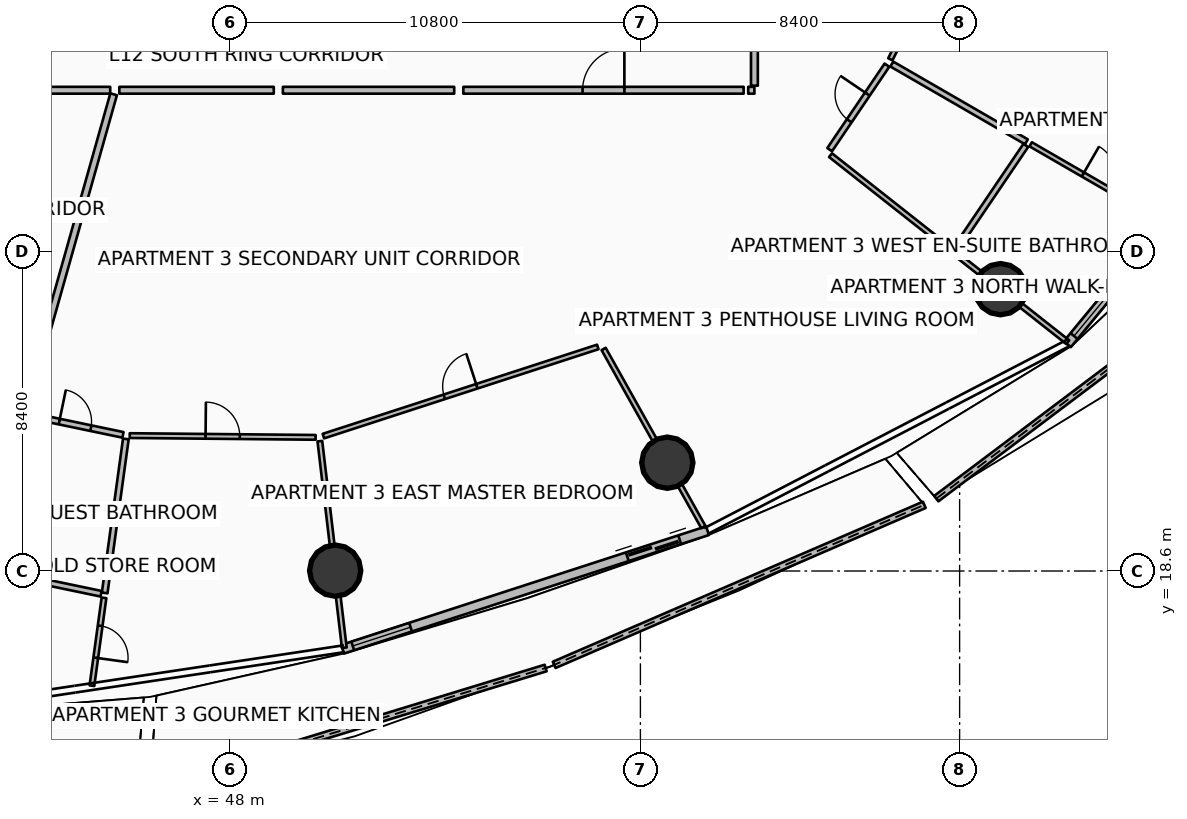
"""IFC4 building model, lengths in metres.
Left out: names, types, materials, properties, quantities, classifications, styles, units other than length and angle.
Written with IfcOpenShell. Run it as: python <this file> out.ifc"""

import sys

from ifc_helpers import new_model, si_unit, direction, frame, frame_2d, origin, origin_2d, place, context, subcontext, project, spatial, polyline, rectangle, circle, outline, extrude, element, fill, save


model = new_model("IFC4")
c1 = context("Model", 3, precision=1e-05, world=origin(), true_north=direction((0.0, 1.0)))
c2 = subcontext(c1, "Body", "Model", "MODEL_VIEW")
j1 = project(units=[si_unit("LENGTHUNIT", "METRE"), si_unit("PLANEANGLEUNIT", "RADIAN")], contexts=[c1])
p1 = place(None, origin())
s1 = spatial("IfcSite", under=j1, at=p1, CompositionType="ELEMENT")
p2 = place(p1, origin())
s2 = spatial("IfcBuilding", under=s1, at=p2, CompositionType="ELEMENT")
p3 = place(p2, frame((0.0, 0.0, 52.65)))
s3 = spatial("IfcBuildingStorey", under=s2, at=p3, CompositionType="ELEMENT", Elevation=52.65)
for number, where, z_axis, x_axis in (
    (1, (50.768, 18.611, 0.0), (0.0, 0.0, 1.0), (1.0, 0.0, 0.0)),
    (2, (59.508, 21.45, 0.0), (0.0, 0.0, 1.0), (1.0, 0.0, 0.0)),
    (3, (68.276, 26.016, 0.0), (0.0, 0.0, 1.0), (1.0, 0.0, 0.0)),
):
    element("IfcColumn", number, at=place(p3, frame(where, z_axis=z_axis, x_axis=x_axis)), inside=s3, PredefinedType="COLUMN", context=c2, shape_type="SweptSolid", body=[
        extrude(circle(Radius=0.675, at=origin_2d()), origin(), (0.0, 0.0, 1.0), 3.5),
    ])
p4 = place(p3, frame((45.886, 12.86, 0.0), z_axis=(0.0, 0.0, 1.0), x_axis=(0.956262130287, 0.292511090695, 0.0)))
e4 = element("IfcWall", 4, at=p4, inside=s3, PredefinedType="PARAPET", context=c2, shape_type="SweptSolid", body=[
    extrude(outline(polyline([(0.0, 0.0), (10.897, 0.0), (10.897, 1.348), (5.448, 1.562), (0.0, 1.747), (0.0, 0.0)])), frame((0.0, 0.09, 0.0), z_axis=(0.0, -1.0, 0.0), x_axis=(1.0, 0.0, 0.0)), (0.0, 0.0, 1.0), 0.18),
])
p5 = place(p3, frame((56.531, 16.13, 0.0), z_axis=(0.0, 0.0, 1.0), x_axis=(0.91788240727, 0.396852474384, 0.0)))
e5 = element("IfcWall", 5, at=p5, inside=s3, PredefinedType="PARAPET", context=c2, shape_type="SweptSolid", body=[
    extrude(outline(polyline([(0.0, 0.0), (10.611, 0.0), (10.611, 1.12), (5.305, 1.182), (0.0, 1.348), (0.0, 0.0)])), frame((0.0, 0.09, 0.0), z_axis=(0.0, -1.0, 0.0), x_axis=(1.0, 0.0, 0.0)), (0.0, 0.0, 1.0), 0.18),
])
p6 = place(p3, frame((66.587, 20.505, 0.0), z_axis=(0.0, 0.0, 1.0), x_axis=(0.798916487869, 0.601441971773, 0.0)))
e6 = element("IfcWall", 6, at=p6, inside=s3, PredefinedType="PARAPET", context=c2, shape_type="SweptSolid", body=[
    extrude(outline(polyline([(0.0, 0.0), (11.803, 0.0), (11.803, 1.348), (5.902, 1.182), (0.0, 1.12), (0.0, 0.0)])), frame((0.0, 0.09, 0.0), z_axis=(0.0, -1.0, 0.0), x_axis=(1.0, 0.0, 0.0)), (0.0, 0.0, 1.0), 0.18),
])
p7 = place(p3, frame((50.964, 16.542, 0.0), z_axis=(0.0, 0.0, 1.0), x_axis=(0.951054679225, 0.309022648238, 0.0)))
e7 = element("IfcWall", 7, at=p7, inside=s3, PredefinedType="SOLIDWALL", context=c2, shape_type="SweptSolid", body=[
    extrude(rectangle(XDim=10.097, YDim=0.24, at=frame_2d((5.048, 0.0))), origin(), (0.0, 0.0, 1.0), 2.45),
])
p8 = place(p7, frame((7.877, 0.0, 0.0)))
e8 = element("IfcOpeningElement", 8, at=p8, cuts=e7, PredefinedType="OPENING", context=c2, shape_type="SweptSolid", body=[
    extrude(rectangle(XDim=1.45, YDim=2.15, at=frame_2d((0.725, 1.075))), frame((0.0, 0.13, 0.0), z_axis=(0.0, -1.0, 0.0), x_axis=(1.0, 0.0, 0.0)), (0.0, 0.0, 1.0), 0.26),
])
p9 = place(p7, frame((0.28, 0.0, 0.65)))
e9 = element("IfcOpeningElement", 9, at=p9, cuts=e7, PredefinedType="OPENING", context=c2, shape_type="SweptSolid", body=[
    extrude(rectangle(XDim=1.6, YDim=1.5, at=frame_2d((0.8, 0.75))), frame((0.0, 0.13, 0.0), z_axis=(0.0, -1.0, 0.0), x_axis=(1.0, 0.0, 0.0)), (0.0, 0.0, 1.0), 0.26),
])
p10 = place(p3, frame((70.033, 24.567, 0.0), z_axis=(0.0, 0.0, 1.0), x_axis=(0.636674332663, 0.771132799281, 0.0)))
e10 = element("IfcWall", 10, at=p10, inside=s3, PredefinedType="SOLIDWALL", context=c2, shape_type="SweptSolid", body=[
    extrude(rectangle(XDim=11.851, YDim=0.24, at=frame_2d((5.926, 0.0))), origin(), (0.0, 0.0, 1.0), 2.45),
])
p11 = place(p10, frame((9.631, 0.0, 0.0)))
e11 = element("IfcOpeningElement", 11, at=p11, cuts=e10, PredefinedType="OPENING", context=c2, shape_type="SweptSolid", body=[
    extrude(rectangle(XDim=1.45, YDim=2.15, at=frame_2d((0.725, 1.075))), frame((0.0, 0.13, 0.0), z_axis=(0.0, -1.0, 0.0), x_axis=(1.0, 0.0, 0.0)), (0.0, 0.0, 1.0), 0.26),
])
p12 = place(p10, frame((0.28, 0.0, 0.65)))
e12 = element("IfcOpeningElement", 12, at=p12, cuts=e10, PredefinedType="OPENING", context=c2, shape_type="SweptSolid", body=[
    extrude(rectangle(XDim=1.6, YDim=1.5, at=frame_2d((0.8, 0.75))), frame((0.0, 0.13, 0.0), z_axis=(0.0, -1.0, 0.0), x_axis=(1.0, 0.0, 0.0)), (0.0, 0.0, 1.0), 0.26),
])
p13 = place(p3, frame((44.938, 31.144, 0.0), z_axis=(0.0, 0.0, 1.0), x_axis=(-0.27143758514, -0.962456044385, 0.0)))
e13 = element("IfcWall", 13, at=p13, inside=s3, PredefinedType="PARTITIONING", context=c2, shape_type="SweptSolid", body=[
    extrude(rectangle(XDim=16.693, YDim=0.18, at=frame_2d((8.346, 0.0))), origin(), (0.0, 0.0, 1.0), 2.867),
])
p14 = place(p3, frame((39.646, 31.25, 0.0), z_axis=(0.0, 0.0, 1.0), x_axis=(1.0, 0.0, 0.0)))
e14 = element("IfcWall", 14, at=p14, inside=s3, PredefinedType="PARTITIONING", context=c2, shape_type="SweptSolid", body=[
    extrude(rectangle(XDim=5.203, YDim=0.18, at=frame_2d((2.601, 0.0))), origin(), (0.0, 0.0, 1.0), 2.867),
])
p15 = place(p3, frame((54.14, 31.25, 0.0), z_axis=(0.0, 0.0, 1.0), x_axis=(1.0, 0.0, 0.0)))
e15 = element("IfcWall", 15, at=p15, inside=s3, PredefinedType="PARTITIONING", context=c2, shape_type="SweptSolid", body=[
    extrude(rectangle(XDim=7.376, YDim=0.18, at=frame_2d((3.688, 0.0))), origin(), (0.0, 0.0, 1.0), 2.867),
])
p16 = place(p15, frame((3.138, 0.0, 0.0)))
e16 = element("IfcOpeningElement", 16, at=p16, cuts=e15, PredefinedType="OPENING", context=c2, shape_type="SweptSolid", body=[
    extrude(rectangle(XDim=1.1, YDim=2.1, at=frame_2d((0.55, 1.05))), frame((0.0, 0.1, 0.0), z_axis=(0.0, -1.0, 0.0), x_axis=(1.0, 0.0, 0.0)), (0.0, 0.0, 1.0), 0.2),
])
p17 = place(p3, frame((45.088, 31.25, 0.0), z_axis=(0.0, 0.0, 1.0), x_axis=(1.0, 0.0, 0.0)))
e17 = element("IfcWall", 17, at=p17, inside=s3, PredefinedType="PARTITIONING", context=c2, shape_type="SweptSolid", body=[
    extrude(rectangle(XDim=4.064, YDim=0.18, at=frame_2d((2.032, 0.0))), origin(), (0.0, 0.0, 1.0), 2.867),
])
p18 = place(p3, frame((42.663, 22.708, 0.0), z_axis=(0.0, 0.0, 1.0), x_axis=(0.97889437531, -0.204366831913, 0.0)))
e18 = element("IfcWall", 18, at=p18, inside=s3, PredefinedType="PARTITIONING", context=c2, shape_type="SweptSolid", body=[
    extrude(rectangle(XDim=2.576, YDim=0.15, at=frame_2d((1.288, 0.0))), origin(), (0.0, 0.0, 1.0), 2.867),
])
p19 = place(p18, frame((0.863, 0.0, 0.0)))
e19 = element("IfcOpeningElement", 19, at=p19, cuts=e18, PredefinedType="OPENING", context=c2, shape_type="SweptSolid", body=[
    extrude(rectangle(XDim=0.85, YDim=2.06, at=frame_2d((0.425, 1.03))), frame((0.0, 0.085, 0.0), z_axis=(0.0, -1.0, 0.0), x_axis=(1.0, 0.0, 0.0)), (0.0, 0.0, 1.0), 0.17),
])
p20 = place(p3, frame((41.517, 18.647, 0.0), z_axis=(0.0, 0.0, 1.0), x_axis=(0.978908333459, -0.204299962518, 0.0)))
e20 = element("IfcWall", 20, at=p20, inside=s3, PredefinedType="PARTITIONING", context=c2, shape_type="SweptSolid", body=[
    extrude(rectangle(XDim=3.158, YDim=0.15, at=frame_2d((1.579, 0.0))), origin(), (0.0, 0.0, 1.0), 2.867),
])
p21 = place(p3, frame((45.26, 22.074, 0.0), z_axis=(0.0, 0.0, 1.0), x_axis=(-0.136279855187, -0.990670379627, 0.0)))
e21 = element("IfcWall", 21, at=p21, inside=s3, PredefinedType="PARTITIONING", context=c2, shape_type="SweptSolid", body=[
    extrude(rectangle(XDim=4.09, YDim=0.15, at=frame_2d((2.045, 0.0))), origin(), (0.0, 0.0, 1.0), 2.94),
])
p22 = place(p3, frame((44.685, 17.894, 0.0), z_axis=(0.0, 0.0, 1.0), x_axis=(-0.136247867624, -0.990674779414, 0.0)))
e22 = element("IfcWall", 22, at=p22, inside=s3, PredefinedType="PARTITIONING", context=c2, shape_type="SweptSolid", body=[
    extrude(rectangle(XDim=2.333, YDim=0.125, at=frame_2d((1.167, 0.0))), origin(), (0.0, 0.0, 1.0), 2.94),
])
p23 = place(p22, frame((0.742, 0.0, 0.0)))
e23 = element("IfcOpeningElement", 23, at=p23, cuts=e22, PredefinedType="OPENING", context=c2, shape_type="SweptSolid", body=[
    extrude(rectangle(XDim=0.85, YDim=2.06, at=frame_2d((0.425, 1.03))), frame((0.0, 0.073, 0.0), z_axis=(0.0, -1.0, 0.0), x_axis=(1.0, 0.0, 0.0)), (0.0, 0.0, 1.0), 0.145),
])
p24 = place(p3, frame((45.362, 22.163, 0.0), z_axis=(0.0, 0.0, 1.0), x_axis=(0.999955503148, -0.009433542483, 0.0)))
e24 = element("IfcWall", 24, at=p24, inside=s3, PredefinedType="PARTITIONING", context=c2, shape_type="SweptSolid", body=[
    extrude(rectangle(XDim=4.891, YDim=0.125, at=frame_2d((2.446, 0.0))), origin(), (0.0, 0.0, 1.0), 2.94),
])
p25 = place(p24, frame((1.996, 0.0, 0.0)))
e25 = element("IfcOpeningElement", 25, at=p25, cuts=e24, PredefinedType="OPENING", context=c2, shape_type="SweptSolid", body=[
    extrude(rectangle(XDim=0.9, YDim=2.08, at=frame_2d((0.45, 1.04))), frame((0.0, 0.073, 0.0), z_axis=(0.0, -1.0, 0.0), x_axis=(1.0, 0.0, 0.0)), (0.0, 0.0, 1.0), 0.145),
])
p26 = place(p3, frame((49.392, 31.25, 0.0), z_axis=(0.0, 0.0, 1.0), x_axis=(1.0, 0.0, 0.0)))
e26 = element("IfcWall", 26, at=p26, inside=s3, PredefinedType="PARTITIONING", context=c2, shape_type="SweptSolid", body=[
    extrude(rectangle(XDim=4.508, YDim=0.18, at=frame_2d((2.254, 0.0))), origin(), (0.0, 0.0, 1.0), 2.867),
])
p27 = place(p3, frame((50.365, 22.017, 0.0), z_axis=(0.0, 0.0, 1.0), x_axis=(0.117503830854, -0.993072429249, 0.0)))
e27 = element("IfcWall", 27, at=p27, inside=s3, PredefinedType="PARTITIONING", context=c2, shape_type="SweptSolid", body=[
    extrude(rectangle(XDim=5.473, YDim=0.125, at=frame_2d((2.736, 0.0))), origin(), (0.0, 0.0, 1.0), 2.867),
])
p28 = place(p3, frame((57.833, 24.443, 0.0), z_axis=(0.0, 0.0, 1.0), x_axis=(0.488618589391, -0.872497492318, 0.0)))
e28 = element("IfcWall", 28, at=p28, inside=s3, PredefinedType="PARTITIONING", context=c2, shape_type="SweptSolid", body=[
    extrude(rectangle(XDim=5.373, YDim=0.125, at=frame_2d((2.687, 0.0))), origin(), (0.0, 0.0, 1.0), 2.867),
])
p29 = place(p3, frame((50.458, 22.15, 0.0), z_axis=(0.0, 0.0, 1.0), x_axis=(0.951061002784, 0.309003186042, 0.0)))
e29 = element("IfcWall", 29, at=p29, inside=s3, PredefinedType="PARTITIONING", context=c2, shape_type="SweptSolid", body=[
    extrude(rectangle(XDim=7.593, YDim=0.125, at=frame_2d((3.796, 0.0))), origin(), (0.0, 0.0, 1.0), 2.867),
])
p30 = place(p29, frame((3.346, 0.0, 0.0)))
e30 = element("IfcOpeningElement", 30, at=p30, cuts=e29, PredefinedType="OPENING", context=c2, shape_type="SweptSolid", body=[
    extrude(rectangle(XDim=0.9, YDim=2.08, at=frame_2d((0.45, 1.04))), frame((0.0, 0.073, 0.0), z_axis=(0.0, -1.0, 0.0), x_axis=(1.0, 0.0, 0.0)), (0.0, 0.0, 1.0), 0.145),
])
p31 = place(p3, frame((61.636, 31.25, 0.0), z_axis=(0.0, 0.0, 1.0), x_axis=(1.0, 0.0, 0.0)))
e31 = element("IfcWall", 31, at=p31, inside=s3, PredefinedType="PARTITIONING", context=c2, shape_type="SweptSolid", body=[
    extrude(rectangle(XDim=0.164, YDim=0.18, at=frame_2d((0.082, 0.0))), origin(), (0.0, 0.0, 1.0), 2.867),
])
p32 = place(p3, frame((61.8, 31.37, 0.0), z_axis=(0.0, 0.0, 1.0), x_axis=(0.0, 1.0, 0.0)))
e32 = element("IfcWall", 32, at=p32, inside=s3, PredefinedType="PARTITIONING", context=c2, shape_type="SweptSolid", body=[
    extrude(rectangle(XDim=6.618, YDim=0.18, at=frame_2d((3.309, 0.0))), origin(), (0.0, 0.0, 1.0), 2.867),
])
p33 = place(p3, frame((63.803, 29.542, 0.0), z_axis=(0.0, 0.0, 1.0), x_axis=(0.785316547054, -0.619094436191, 0.0)))
e33 = element("IfcWall", 33, at=p33, inside=s3, PredefinedType="PARTITIONING", context=c2, shape_type="SweptSolid", body=[
    extrude(rectangle(XDim=7.949, YDim=0.125, at=frame_2d((3.975, 0.0))), origin(), (0.0, 0.0, 1.0), 2.867),
])
p34 = place(p3, frame((63.781, 29.687, 0.0), z_axis=(0.0, 0.0, 1.0), x_axis=(0.561145635053, 0.82771708709, 0.0)))
e34 = element("IfcWall", 34, at=p34, inside=s3, PredefinedType="PARTITIONING", context=c2, shape_type="SweptSolid", body=[
    extrude(rectangle(XDim=2.685, YDim=0.15, at=frame_2d((1.343, 0.0))), origin(), (0.0, 0.0, 1.0), 2.867),
])
p35 = place(p34, frame((0.918, 0.0, 0.0)))
e35 = element("IfcOpeningElement", 35, at=p35, cuts=e34, PredefinedType="OPENING", context=c2, shape_type="SweptSolid", body=[
    extrude(rectangle(XDim=0.85, YDim=2.06, at=frame_2d((0.425, 1.03))), frame((0.0, 0.085, 0.0), z_axis=(0.0, -1.0, 0.0), x_axis=(1.0, 0.0, 0.0)), (0.0, 0.0, 1.0), 0.17),
])
p36 = place(p3, frame((67.094, 27.074, 0.0), z_axis=(0.0, 0.0, 1.0), x_axis=(0.561136770773, 0.827723096504, 0.0)))
e36 = element("IfcWall", 36, at=p36, inside=s3, PredefinedType="PARTITIONING", context=c2, shape_type="SweptSolid", body=[
    extrude(rectangle(XDim=3.292, YDim=0.15, at=frame_2d((1.646, 0.0))), origin(), (0.0, 0.0, 1.0), 2.867),
])
p37 = place(p3, frame((65.416, 31.939, 0.0), z_axis=(0.0, 0.0, 1.0), x_axis=(0.865897249189, -0.500221904605, 0.0)))
e37 = element("IfcWall", 37, at=p37, inside=s3, PredefinedType="PARTITIONING", context=c2, shape_type="SweptSolid", body=[
    extrude(rectangle(XDim=4.09, YDim=0.15, at=frame_2d((2.045, 0.0))), origin(), (0.0, 0.0, 1.0), 2.94),
])
p38 = place(p3, frame((69.07, 29.828, 0.0), z_axis=(0.0, 0.0, 1.0), x_axis=(0.865911782311, -0.500196746546, 0.0)))
e38 = element("IfcWall", 38, at=p38, inside=s3, PredefinedType="PARTITIONING", context=c2, shape_type="SweptSolid", body=[
    extrude(rectangle(XDim=4.025, YDim=0.125, at=frame_2d((2.012, 0.0))), origin(), (0.0, 0.0, 1.0), 2.94),
])
p39 = place(p38, frame((1.587, 0.0, 0.0)))
e39 = element("IfcOpeningElement", 39, at=p39, cuts=e38, PredefinedType="OPENING", context=c2, shape_type="SweptSolid", body=[
    extrude(rectangle(XDim=0.85, YDim=2.06, at=frame_2d((0.425, 1.03))), frame((0.0, 0.073, 0.0), z_axis=(0.0, -1.0, 0.0), x_axis=(1.0, 0.0, 0.0)), (0.0, 0.0, 1.0), 0.145),
])
p40 = place(p3, frame((66.598, 34.341, 0.0), z_axis=(0.0, 0.0, 1.0), x_axis=(0.9246609872, -0.380791358556, 0.0)))
e40 = element("IfcWall", 40, at=p40, inside=s3, PredefinedType="PARTITIONING", context=c2, shape_type="SweptSolid", body=[
    extrude(rectangle(XDim=9.161, YDim=0.125, at=frame_2d((4.58, 0.0))), origin(), (0.0, 0.0, 1.0), 2.94),
])
p41 = place(p3, frame((65.377, 32.065, 0.0), z_axis=(0.0, 0.0, 1.0), x_axis=(0.441490145673, 0.897266098364, 0.0)))
e41 = element("IfcWall", 41, at=p41, inside=s3, PredefinedType="PARTITIONING", context=c2, shape_type="SweptSolid", body=[
    extrude(rectangle(XDim=2.495, YDim=0.125, at=frame_2d((1.248, 0.0))), origin(), (0.0, 0.0, 1.0), 2.94),
])
p42 = place(p41, frame((0.823, 0.0, 0.0)))
e42 = element("IfcOpeningElement", 42, at=p42, cuts=e41, PredefinedType="OPENING", context=c2, shape_type="SweptSolid", body=[
    extrude(rectangle(XDim=0.85, YDim=2.06, at=frame_2d((0.425, 1.03))), frame((0.0, 0.073, 0.0), z_axis=(0.0, -1.0, 0.0), x_axis=(1.0, 0.0, 0.0)), (0.0, 0.0, 1.0), 0.145),
])
p43 = place(p8, origin())
e43 = element("IfcDoor", 43, at=p43, inside=s3, OperationType="DOUBLE_DOOR_SLIDING", PredefinedType="DOOR", context=c2, shape_type="SweptSolid", body=[
    extrude(rectangle(XDim=1.45, YDim=2.15, at=frame_2d((0.725, 1.075))), frame((0.0, 0.025, 0.0), z_axis=(0.0, -1.0, 0.0), x_axis=(1.0, 0.0, 0.0)), (0.0, 0.0, 1.0), 0.05),
])
fill(e8, e43)
p44 = place(p9, origin())
e44 = element("IfcWindow", 44, at=p44, inside=s3, PartitioningType="SINGLE_PANEL", PredefinedType="WINDOW", context=c2, shape_type="SweptSolid", body=[
    extrude(rectangle(XDim=1.6, YDim=1.5, at=frame_2d((0.8, 0.75))), frame((0.0, 0.03, 0.0), z_axis=(0.0, -1.0, 0.0), x_axis=(1.0, 0.0, 0.0)), (0.0, 0.0, 1.0), 0.06),
])
fill(e9, e44)
p45 = place(p12, origin())
e45 = element("IfcWindow", 45, at=p45, inside=s3, PartitioningType="SINGLE_PANEL", PredefinedType="WINDOW", context=c2, shape_type="SweptSolid", body=[
    extrude(rectangle(XDim=1.6, YDim=1.5, at=frame_2d((0.8, 0.75))), frame((0.0, 0.03, 0.0), z_axis=(0.0, -1.0, 0.0), x_axis=(1.0, 0.0, 0.0)), (0.0, 0.0, 1.0), 0.06),
])
fill(e12, e45)
p46 = place(p16, origin())
e46 = element("IfcDoor", 46, at=p46, inside=s3, OperationType="SINGLE_SWING_RIGHT", PredefinedType="DOOR", context=c2, shape_type="SweptSolid", body=[
    extrude(rectangle(XDim=1.1, YDim=2.1, at=frame_2d((0.55, 1.05))), frame((0.0, 0.025, 0.0), z_axis=(0.0, -1.0, 0.0), x_axis=(1.0, 0.0, 0.0)), (0.0, 0.0, 1.0), 0.05),
])
fill(e16, e46)
p47 = place(p19, origin())
e47 = element("IfcDoor", 47, at=p47, inside=s3, OperationType="SINGLE_SWING_LEFT", PredefinedType="DOOR", context=c2, shape_type="SweptSolid", body=[
    extrude(rectangle(XDim=0.85, YDim=2.06, at=frame_2d((0.425, 1.03))), frame((0.0, 0.025, 0.0), z_axis=(0.0, -1.0, 0.0), x_axis=(1.0, 0.0, 0.0)), (0.0, 0.0, 1.0), 0.05),
])
fill(e19, e47)
p48 = place(p23, origin())
e48 = element("IfcDoor", 48, at=p48, inside=s3, OperationType="SINGLE_SWING_RIGHT", PredefinedType="DOOR", context=c2, shape_type="SweptSolid", body=[
    extrude(rectangle(XDim=0.85, YDim=2.06, at=frame_2d((0.425, 1.03))), frame((0.0, 0.025, 0.0), z_axis=(0.0, -1.0, 0.0), x_axis=(1.0, 0.0, 0.0)), (0.0, 0.0, 1.0), 0.05),
])
fill(e23, e48)
p49 = place(p25, origin())
e49 = element("IfcDoor", 49, at=p49, inside=s3, OperationType="SINGLE_SWING_LEFT", PredefinedType="DOOR", context=c2, shape_type="SweptSolid", body=[
    extrude(rectangle(XDim=0.9, YDim=2.08, at=frame_2d((0.45, 1.04))), frame((0.0, 0.025, 0.0), z_axis=(0.0, -1.0, 0.0), x_axis=(1.0, 0.0, 0.0)), (0.0, 0.0, 1.0), 0.05),
])
fill(e25, e49)
p50 = place(p30, origin())
e50 = element("IfcDoor", 50, at=p50, inside=s3, OperationType="SINGLE_SWING_RIGHT", PredefinedType="DOOR", context=c2, shape_type="SweptSolid", body=[
    extrude(rectangle(XDim=0.9, YDim=2.08, at=frame_2d((0.45, 1.04))), frame((0.0, 0.025, 0.0), z_axis=(0.0, -1.0, 0.0), x_axis=(1.0, 0.0, 0.0)), (0.0, 0.0, 1.0), 0.05),
])
fill(e30, e50)
p51 = place(p35, origin())
e51 = element("IfcDoor", 51, at=p51, inside=s3, OperationType="SINGLE_SWING_RIGHT", PredefinedType="DOOR", context=c2, shape_type="SweptSolid", body=[
    extrude(rectangle(XDim=0.85, YDim=2.06, at=frame_2d((0.425, 1.03))), frame((0.0, 0.025, 0.0), z_axis=(0.0, -1.0, 0.0), x_axis=(1.0, 0.0, 0.0)), (0.0, 0.0, 1.0), 0.05),
])
fill(e35, e51)
p52 = place(p39, origin())
e52 = element("IfcDoor", 52, at=p52, inside=s3, OperationType="SINGLE_SWING_LEFT", PredefinedType="DOOR", context=c2, shape_type="SweptSolid", body=[
    extrude(rectangle(XDim=0.85, YDim=2.06, at=frame_2d((0.425, 1.03))), frame((0.0, 0.025, 0.0), z_axis=(0.0, -1.0, 0.0), x_axis=(1.0, 0.0, 0.0)), (0.0, 0.0, 1.0), 0.05),
])
fill(e39, e52)
save(model, sys.argv[1])
